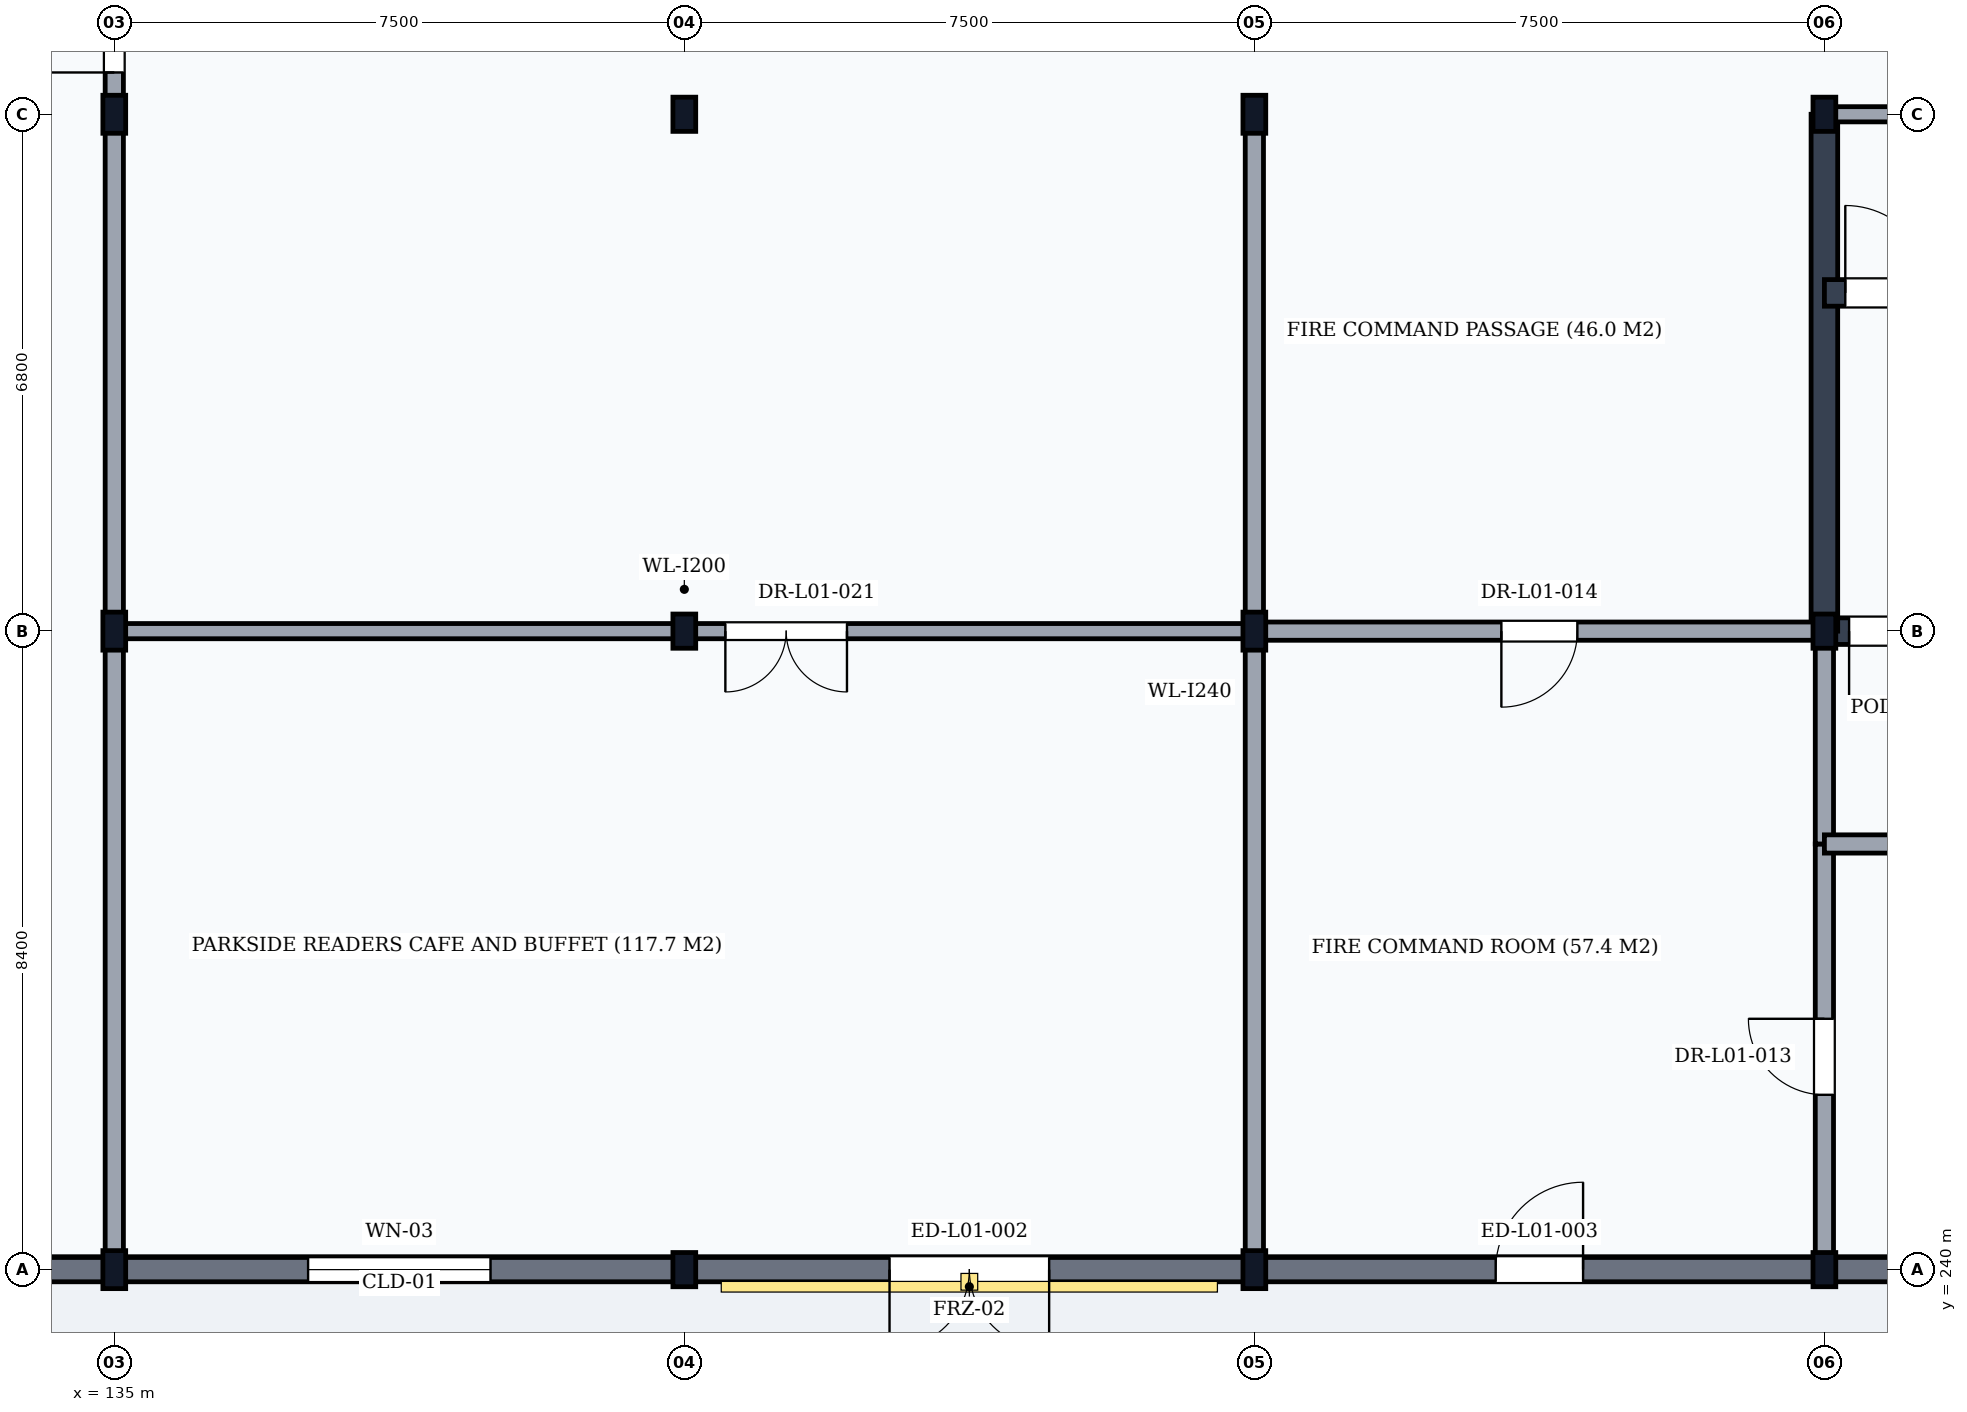
"""IFC4 building model, lengths in metres.
Left out: names, types, materials, properties, quantities, classifications, styles, units other than length and angle.
Written with IfcOpenShell. Run it as: python <this file> out.ifc"""

import sys

from ifc_helpers import new_model, si_unit, direction, frame, frame_2d, origin, origin_2d, place, context, subcontext, project, spatial, rectangle, i_section, extrude, element, fill, save


model = new_model("IFC4")
c1 = context("Model", 3, precision=1e-05, world=origin(), true_north=direction((0.0, 1.0)))
c2 = subcontext(c1, "Body", "Model", "MODEL_VIEW")
j1 = project(units=[si_unit("LENGTHUNIT", "METRE"), si_unit("PLANEANGLEUNIT", "RADIAN")], contexts=[c1])
p1 = place(None, origin())
s1 = spatial("IfcSite", under=j1, at=p1, CompositionType="ELEMENT")
p2 = place(p1, origin())
s2 = spatial("IfcBuilding", under=s1, at=p2, CompositionType="ELEMENT")
p3 = place(p2, origin())
s3 = spatial("IfcBuildingStorey", under=s2, at=p3, CompositionType="ELEMENT", Elevation=0.0)
for number, where, z_axis, x_axis in (
    (1, (135.0, 240.0, 0.0), (0.0, 0.0, 1.0), (1.0, 0.0, 0.0)),
    (2, (135.0, 248.4, 0.0), (0.0, 0.0, 1.0), (1.0, 0.0, 0.0)),
    (3, (135.0, 255.2, 0.0), (0.0, 0.0, 1.0), (1.0, 0.0, 0.0)),
):
    element("IfcColumn", number, at=place(p3, frame(where, z_axis=z_axis, x_axis=x_axis)), inside=s3, PredefinedType="COLUMN", context=c2, shape_type="SweptSolid", body=[
        extrude(i_section(OverallWidth=0.3, OverallDepth=0.5, WebThickness=0.014, FlangeThickness=0.028, FilletRadius=0.027, at=origin_2d()), origin(), (0.0, 0.0, 1.0), 5.4),
    ])
for number, where, z_axis, x_axis in (
    (4, (142.5, 240.0, 0.0), (0.0, 0.0, 1.0), (1.0, 0.0, 0.0)),
    (5, (142.5, 248.4, 0.0), (0.0, 0.0, 1.0), (1.0, 0.0, 0.0)),
    (6, (142.5, 255.2, 0.0), (0.0, 0.0, 1.0), (1.0, 0.0, 0.0)),
):
    element("IfcColumn", number, at=place(p3, frame(where, z_axis=z_axis, x_axis=x_axis)), inside=s3, PredefinedType="COLUMN", context=c2, shape_type="SweptSolid", body=[
        extrude(i_section(OverallWidth=0.3, OverallDepth=0.45, WebThickness=0.014, FlangeThickness=0.026, FilletRadius=0.027, at=origin_2d()), origin(), (0.0, 0.0, 1.0), 5.4),
    ])
for number, where, z_axis, x_axis in (
    (7, (150.0, 240.0, 0.0), (0.0, 0.0, 1.0), (1.0, 0.0, 0.0)),
    (8, (150.0, 248.4, 0.0), (0.0, 0.0, 1.0), (1.0, 0.0, 0.0)),
    (9, (150.0, 255.2, 0.0), (0.0, 0.0, 1.0), (1.0, 0.0, 0.0)),
):
    element("IfcColumn", number, at=place(p3, frame(where, z_axis=z_axis, x_axis=x_axis)), inside=s3, PredefinedType="COLUMN", context=c2, shape_type="SweptSolid", body=[
        extrude(i_section(OverallWidth=0.3, OverallDepth=0.5, WebThickness=0.014, FlangeThickness=0.028, FilletRadius=0.027, at=origin_2d()), origin(), (0.0, 0.0, 1.0), 5.4),
    ])
for number, where, z_axis, x_axis in (
    (10, (157.5, 240.0, 0.0), (0.0, 0.0, 1.0), (1.0, 0.0, 0.0)),
    (11, (157.5, 248.4, 0.0), (0.0, 0.0, 1.0), (1.0, 0.0, 0.0)),
    (12, (157.5, 255.2, 0.0), (0.0, 0.0, 1.0), (1.0, 0.0, 0.0)),
):
    element("IfcColumn", number, at=place(p3, frame(where, z_axis=z_axis, x_axis=x_axis)), inside=s3, PredefinedType="COLUMN", context=c2, shape_type="SweptSolid", body=[
        extrude(i_section(OverallWidth=0.3, OverallDepth=0.45, WebThickness=0.014, FlangeThickness=0.026, FilletRadius=0.027, at=origin_2d()), origin(), (0.0, 0.0, 1.0), 5.4),
    ])
p4 = place(p3, frame((127.506, 240.0, 0.0), z_axis=(0.0, 0.0, 1.0), x_axis=(1.0, 0.0, 0.0)))
e13 = element("IfcWall", 13, at=p4, inside=s3, PredefinedType="SOLIDWALL", context=c2, shape_type="SweptSolid", body=[
    extrude(rectangle(XDim=7.488, YDim=0.32, at=frame_2d((3.744, 0.0))), origin(), (0.0, 0.0, 1.0), 4.878),
])
p5 = place(p4, frame((2.144, 0.0, 0.0)))
e14 = element("IfcOpeningElement", 14, at=p5, cuts=e13, PredefinedType="OPENING", context=c2, shape_type="SweptSolid", body=[
    extrude(rectangle(XDim=3.2, YDim=3.0, at=frame_2d((1.6, 1.5))), frame((0.0, 0.175, 0.0), z_axis=(0.0, -1.0, 0.0), x_axis=(1.0, 0.0, 0.0)), (0.0, 0.0, 1.0), 0.35),
])
p6 = place(p3, frame((135.006, 240.0, 0.0), z_axis=(0.0, 0.0, 1.0), x_axis=(1.0, 0.0, 0.0)))
e15 = element("IfcWall", 15, at=p6, inside=s3, PredefinedType="SOLIDWALL", context=c2, shape_type="SweptSolid", body=[
    extrude(rectangle(XDim=7.488, YDim=0.32, at=frame_2d((3.744, 0.0))), origin(), (0.0, 0.0, 1.0), 4.878),
])
p7 = place(p6, frame((2.544, 0.0, 0.95)))
e16 = element("IfcOpeningElement", 16, at=p7, cuts=e15, PredefinedType="OPENING", context=c2, shape_type="SweptSolid", body=[
    extrude(rectangle(XDim=2.4, YDim=2.8, at=frame_2d((1.2, 1.4))), frame((0.0, 0.175, 0.0), z_axis=(0.0, -1.0, 0.0), x_axis=(1.0, 0.0, 0.0)), (0.0, 0.0, 1.0), 0.35),
])
p8 = place(p3, frame((142.506, 240.0, 0.0), z_axis=(0.0, 0.0, 1.0), x_axis=(1.0, 0.0, 0.0)))
e17 = element("IfcWall", 17, at=p8, inside=s3, PredefinedType="SOLIDWALL", context=c2, shape_type="SweptSolid", body=[
    extrude(rectangle(XDim=7.488, YDim=0.32, at=frame_2d((3.744, 0.0))), origin(), (0.0, 0.0, 1.0), 4.878),
])
p9 = place(p8, frame((2.694, 0.0, 0.0)))
e18 = element("IfcOpeningElement", 18, at=p9, cuts=e17, PredefinedType="OPENING", context=c2, shape_type="SweptSolid", body=[
    extrude(rectangle(XDim=2.1, YDim=2.7, at=frame_2d((1.05, 1.35))), frame((0.0, 0.175, 0.0), z_axis=(0.0, -1.0, 0.0), x_axis=(1.0, 0.0, 0.0)), (0.0, 0.0, 1.0), 0.35),
])
p10 = place(p3, frame((150.006, 240.0, 0.0), z_axis=(0.0, 0.0, 1.0), x_axis=(1.0, 0.0, 0.0)))
e19 = element("IfcWall", 19, at=p10, inside=s3, PredefinedType="SOLIDWALL", context=c2, shape_type="SweptSolid", body=[
    extrude(rectangle(XDim=7.488, YDim=0.32, at=frame_2d((3.744, 0.0))), origin(), (0.0, 0.0, 1.0), 4.878),
])
p11 = place(p10, frame((3.169, 0.0, 0.0)))
e20 = element("IfcOpeningElement", 20, at=p11, cuts=e19, PredefinedType="OPENING", context=c2, shape_type="SweptSolid", body=[
    extrude(rectangle(XDim=1.15, YDim=2.25, at=frame_2d((0.575, 1.125))), frame((0.0, 0.175, 0.0), z_axis=(0.0, -1.0, 0.0), x_axis=(1.0, 0.0, 0.0)), (0.0, 0.0, 1.0), 0.35),
])
p12 = place(p3, frame((157.506, 240.0, 0.0), z_axis=(0.0, 0.0, 1.0), x_axis=(1.0, 0.0, 0.0)))
e21 = element("IfcWall", 21, at=p12, inside=s3, PredefinedType="SOLIDWALL", context=c2, shape_type="SweptSolid", body=[
    extrude(rectangle(XDim=7.488, YDim=0.32, at=frame_2d((3.744, 0.0))), origin(), (0.0, 0.0, 1.0), 4.878),
])
p13 = place(p12, frame((2.844, 0.0, 0.95)))
e22 = element("IfcOpeningElement", 22, at=p13, cuts=e21, PredefinedType="OPENING", context=c2, shape_type="SweptSolid", body=[
    extrude(rectangle(XDim=1.8, YDim=2.6, at=frame_2d((0.9, 1.3))), frame((0.0, 0.175, 0.0), z_axis=(0.0, -1.0, 0.0), x_axis=(1.0, 0.0, 0.0)), (0.0, 0.0, 1.0), 0.35),
])
p14 = place(p3, frame((120.1, 240.1, 5.4), z_axis=(0.0, 0.0, 1.0), x_axis=(1.0, 0.0, 0.0)))
e23 = element("IfcWall", 23, at=p14, inside=s3, PredefinedType="PARAPET", context=c2, shape_type="SweptSolid", body=[
    extrude(rectangle(XDim=167.8, YDim=0.18, at=frame_2d((83.9, 0.0))), origin(), (0.0, 0.0, 1.0), 1.2),
])
p15 = place(p3, frame((157.5, 248.4, 0.0), z_axis=(0.0, 0.0, 1.0), x_axis=(1.0, 0.0, 0.0)))
e24 = element("IfcWall", 24, at=p15, inside=s3, PredefinedType="SHEAR", context=c2, shape_type="SweptSolid", body=[
    extrude(rectangle(XDim=7.5, YDim=0.35, at=frame_2d((3.75, 0.0))), origin(), (0.0, 0.0, 1.0), 5.14),
])
p16 = place(p15, frame((0.325, 0.0, 0.0)))
e25 = element("IfcOpeningElement", 25, at=p16, cuts=e24, PredefinedType="OPENING", context=c2, shape_type="SweptSolid", body=[
    extrude(rectangle(XDim=1.15, YDim=2.15, at=frame_2d((0.575, 1.075))), frame((0.0, 0.19, 0.0), z_axis=(0.0, -1.0, 0.0), x_axis=(1.0, 0.0, 0.0)), (0.0, 0.0, 1.0), 0.38),
])
p17 = place(p3, frame((157.5, 248.4, 0.0), z_axis=(0.0, 0.0, 1.0), x_axis=(0.0, 1.0, 0.0)))
e26 = element("IfcWall", 26, at=p17, inside=s3, PredefinedType="SHEAR", context=c2, shape_type="SweptSolid", body=[
    extrude(rectangle(XDim=6.8, YDim=0.35, at=frame_2d((3.4, 0.0))), origin(), (0.0, 0.0, 1.0), 5.14),
])
p18 = place(p3, frame((157.5, 252.85, 0.0), z_axis=(0.0, 0.0, 1.0), x_axis=(1.0, 0.0, 0.0)))
e27 = element("IfcWall", 27, at=p18, inside=s3, PredefinedType="SHEAR", context=c2, shape_type="SweptSolid", body=[
    extrude(rectangle(XDim=7.5, YDim=0.35, at=frame_2d((3.75, 0.0))), origin(), (0.0, 0.0, 1.0), 5.14),
])
p19 = place(p18, frame((0.275, 0.0, 0.0)))
e28 = element("IfcOpeningElement", 28, at=p19, cuts=e27, PredefinedType="OPENING", context=c2, shape_type="SweptSolid", body=[
    extrude(rectangle(XDim=1.15, YDim=2.15, at=frame_2d((0.575, 1.075))), frame((0.0, 0.19, 0.0), z_axis=(0.0, -1.0, 0.0), x_axis=(1.0, 0.0, 0.0)), (0.0, 0.0, 1.0), 0.38),
])
p20 = place(p3, frame((157.5, 255.2, 0.0), z_axis=(0.0, 0.0, 1.0), x_axis=(1.0, 0.0, 0.0)))
e29 = element("IfcWall", 29, at=p20, inside=s3, PredefinedType="PARTITIONING", context=c2, shape_type="SweptSolid", body=[
    extrude(rectangle(XDim=7.5, YDim=0.2, at=frame_2d((3.75, 0.0))), origin(), (0.0, 0.0, 1.0), 4.778),
])
p21 = place(p20, frame((3.025, 0.0, 0.0)))
e30 = element("IfcOpeningElement", 30, at=p21, cuts=e29, PredefinedType="OPENING", context=c2, shape_type="SweptSolid", body=[
    extrude(rectangle(XDim=1.45, YDim=2.2, at=frame_2d((0.725, 1.1))), frame((0.0, 0.115, 0.0), z_axis=(0.0, -1.0, 0.0), x_axis=(1.0, 0.0, 0.0)), (0.0, 0.0, 1.0), 0.23),
])
p22 = place(p3, frame((150.0, 240.0, 0.0), z_axis=(0.0, 0.0, 1.0), x_axis=(0.0, 1.0, 0.0)))
e31 = element("IfcWall", 31, at=p22, inside=s3, PredefinedType="PARTITIONING", context=c2, shape_type="SweptSolid", body=[
    extrude(rectangle(XDim=15.2, YDim=0.24, at=frame_2d((7.6, 0.0))), origin(), (0.0, 0.0, 1.0), 4.688),
])
p23 = place(p3, frame((157.5, 240.0, 0.0), z_axis=(0.0, 0.0, 1.0), x_axis=(0.0, 1.0, 0.0)))
e32 = element("IfcWall", 32, at=p23, inside=s3, PredefinedType="PARTITIONING", context=c2, shape_type="SweptSolid", body=[
    extrude(rectangle(XDim=5.6, YDim=0.24, at=frame_2d((2.8, 0.0))), origin(), (0.0, 0.0, 1.0), 4.688),
])
p24 = place(p23, frame((2.3, 0.0, 0.0)))
e33 = element("IfcOpeningElement", 33, at=p24, cuts=e32, PredefinedType="OPENING", context=c2, shape_type="SweptSolid", body=[
    extrude(rectangle(XDim=1.0, YDim=2.1, at=frame_2d((0.5, 1.05))), frame((0.0, 0.135, 0.0), z_axis=(0.0, -1.0, 0.0), x_axis=(1.0, 0.0, 0.0)), (0.0, 0.0, 1.0), 0.27),
])
p25 = place(p3, frame((157.5, 245.6, 0.0), z_axis=(0.0, 0.0, 1.0), x_axis=(0.0, 1.0, 0.0)))
e34 = element("IfcWall", 34, at=p25, inside=s3, PredefinedType="PARTITIONING", context=c2, shape_type="SweptSolid", body=[
    extrude(rectangle(XDim=2.8, YDim=0.24, at=frame_2d((1.4, 0.0))), origin(), (0.0, 0.0, 1.0), 4.688),
])
p26 = place(p3, frame((150.0, 248.4, 0.0), z_axis=(0.0, 0.0, 1.0), x_axis=(1.0, 0.0, 0.0)))
e35 = element("IfcWall", 35, at=p26, inside=s3, PredefinedType="PARTITIONING", context=c2, shape_type="SweptSolid", body=[
    extrude(rectangle(XDim=7.5, YDim=0.24, at=frame_2d((3.75, 0.0))), origin(), (0.0, 0.0, 1.0), 4.778),
])
p27 = place(p26, frame((3.25, 0.0, 0.0)))
e36 = element("IfcOpeningElement", 36, at=p27, cuts=e35, PredefinedType="OPENING", context=c2, shape_type="SweptSolid", body=[
    extrude(rectangle(XDim=1.0, YDim=2.1, at=frame_2d((0.5, 1.05))), frame((0.0, 0.135, 0.0), z_axis=(0.0, -1.0, 0.0), x_axis=(1.0, 0.0, 0.0)), (0.0, 0.0, 1.0), 0.27),
])
p28 = place(p3, frame((135.0, 240.0, 0.0), z_axis=(0.0, 0.0, 1.0), x_axis=(0.0, 1.0, 0.0)))
e37 = element("IfcWall", 37, at=p28, inside=s3, PredefinedType="PARTITIONING", context=c2, shape_type="SweptSolid", body=[
    extrude(rectangle(XDim=18.2, YDim=0.24, at=frame_2d((9.1, 0.0))), origin(), (0.0, 0.0, 1.0), 4.688),
])
p29 = place(p28, frame((15.75, 0.0, 0.0)))
e38 = element("IfcOpeningElement", 38, at=p29, cuts=e37, PredefinedType="OPENING", context=c2, shape_type="SweptSolid", body=[
    extrude(rectangle(XDim=1.8, YDim=2.25, at=frame_2d((0.9, 1.125))), frame((0.0, 0.135, 0.0), z_axis=(0.0, -1.0, 0.0), x_axis=(1.0, 0.0, 0.0)), (0.0, 0.0, 1.0), 0.27),
])
p30 = place(p3, frame((157.5, 245.6, 0.0), z_axis=(0.0, 0.0, 1.0), x_axis=(1.0, 0.0, 0.0)))
e39 = element("IfcWall", 39, at=p30, inside=s3, PredefinedType="PARTITIONING", context=c2, shape_type="SweptSolid", body=[
    extrude(rectangle(XDim=7.5, YDim=0.24, at=frame_2d((3.75, 0.0))), origin(), (0.0, 0.0, 1.0), 5.15),
])
p31 = place(p3, frame((135.0, 248.4, 0.0), z_axis=(0.0, 0.0, 1.0), x_axis=(1.0, 0.0, 0.0)))
e40 = element("IfcWall", 40, at=p31, inside=s3, PredefinedType="PARTITIONING", context=c2, shape_type="SweptSolid", body=[
    extrude(rectangle(XDim=15.0, YDim=0.2, at=frame_2d((7.5, 0.0))), origin(), (0.0, 0.0, 1.0), 4.778),
])
p32 = place(p31, frame((8.04, 0.0, 0.0)))
e41 = element("IfcOpeningElement", 41, at=p32, cuts=e40, PredefinedType="OPENING", context=c2, shape_type="SweptSolid", body=[
    extrude(rectangle(XDim=1.6, YDim=2.25, at=frame_2d((0.8, 1.125))), frame((0.0, 0.115, 0.0), z_axis=(0.0, -1.0, 0.0), x_axis=(1.0, 0.0, 0.0)), (0.0, 0.0, 1.0), 0.23),
])
p33 = place(p7, origin())
e42 = element("IfcWindow", 42, at=p33, inside=s3, PartitioningType="DOUBLE_PANEL_VERTICAL", PredefinedType="WINDOW", context=c2, shape_type="SweptSolid", body=[
    extrude(rectangle(XDim=2.4, YDim=2.8, at=frame_2d((1.2, 1.4))), frame((0.0, 0.03, 0.0), z_axis=(0.0, -1.0, 0.0), x_axis=(1.0, 0.0, 0.0)), (0.0, 0.0, 1.0), 0.06),
])
fill(e16, e42)
p34 = place(p9, frame((2.1, 0.0, 0.0), z_axis=(0.0, 0.0, 1.0), x_axis=(-1.0, 0.0, 0.0)))
e43 = element("IfcDoor", 43, at=p34, inside=s3, OperationType="DOUBLE_DOOR_SINGLE_SWING", PredefinedType="DOOR", context=c2, shape_type="SweptSolid", body=[
    extrude(rectangle(XDim=2.1, YDim=2.7, at=frame_2d((1.05, 1.35))), frame((0.0, 0.025, 0.0), z_axis=(0.0, -1.0, 0.0), x_axis=(1.0, 0.0, 0.0)), (0.0, 0.0, 1.0), 0.05),
])
fill(e18, e43)
p35 = place(p11, frame((1.15, 0.0, 0.0), z_axis=(0.0, 0.0, 1.0), x_axis=(-1.0, 0.0, 0.0)))
e44 = element("IfcDoor", 44, at=p35, inside=s3, OperationType="SINGLE_SWING_LEFT", PredefinedType="DOOR", context=c2, shape_type="SweptSolid", body=[
    extrude(rectangle(XDim=1.15, YDim=2.25, at=frame_2d((0.575, 1.125))), frame((0.0, 0.025, 0.0), z_axis=(0.0, -1.0, 0.0), x_axis=(1.0, 0.0, 0.0)), (0.0, 0.0, 1.0), 0.05),
])
fill(e20, e44)
p36 = place(p19, origin())
e45 = element("IfcDoor", 45, at=p36, inside=s3, OperationType="SINGLE_SWING_LEFT", PredefinedType="DOOR", context=c2, shape_type="SweptSolid", body=[
    extrude(rectangle(XDim=1.15, YDim=2.15, at=frame_2d((0.575, 1.075))), frame((0.0, 0.025, 0.0), z_axis=(0.0, -1.0, 0.0), x_axis=(1.0, 0.0, 0.0)), (0.0, 0.0, 1.0), 0.05),
])
fill(e28, e45)
p37 = place(p16, frame((1.15, 0.0, 0.0), z_axis=(0.0, 0.0, 1.0), x_axis=(-1.0, 0.0, 0.0)))
e46 = element("IfcDoor", 46, at=p37, inside=s3, OperationType="SINGLE_SWING_RIGHT", PredefinedType="DOOR", context=c2, shape_type="SweptSolid", body=[
    extrude(rectangle(XDim=1.15, YDim=2.15, at=frame_2d((0.575, 1.075))), frame((0.0, 0.025, 0.0), z_axis=(0.0, -1.0, 0.0), x_axis=(1.0, 0.0, 0.0)), (0.0, 0.0, 1.0), 0.05),
])
fill(e25, e46)
p38 = place(p24, frame((1.0, 0.0, 0.0), z_axis=(0.0, 0.0, 1.0), x_axis=(-1.0, 0.0, 0.0)))
e47 = element("IfcDoor", 47, at=p38, inside=s3, OperationType="SINGLE_SWING_LEFT", PredefinedType="DOOR", context=c2, shape_type="SweptSolid", body=[
    extrude(rectangle(XDim=1.0, YDim=2.1, at=frame_2d((0.5, 1.05))), frame((0.0, 0.025, 0.0), z_axis=(0.0, -1.0, 0.0), x_axis=(1.0, 0.0, 0.0)), (0.0, 0.0, 1.0), 0.05),
])
fill(e33, e47)
p39 = place(p27, frame((1.0, 0.0, 0.0), z_axis=(0.0, 0.0, 1.0), x_axis=(-1.0, 0.0, 0.0)))
e48 = element("IfcDoor", 48, at=p39, inside=s3, OperationType="SINGLE_SWING_RIGHT", PredefinedType="DOOR", context=c2, shape_type="SweptSolid", body=[
    extrude(rectangle(XDim=1.0, YDim=2.1, at=frame_2d((0.5, 1.05))), frame((0.0, 0.025, 0.0), z_axis=(0.0, -1.0, 0.0), x_axis=(1.0, 0.0, 0.0)), (0.0, 0.0, 1.0), 0.05),
])
fill(e36, e48)
p40 = place(p29, origin())
e49 = element("IfcDoor", 49, at=p40, inside=s3, OperationType="DOUBLE_DOOR_SINGLE_SWING", PredefinedType="DOOR", context=c2, shape_type="SweptSolid", body=[
    extrude(rectangle(XDim=1.8, YDim=2.25, at=frame_2d((0.9, 1.125))), frame((0.0, 0.025, 0.0), z_axis=(0.0, -1.0, 0.0), x_axis=(1.0, 0.0, 0.0)), (0.0, 0.0, 1.0), 0.05),
])
fill(e38, e49)
p41 = place(p32, frame((1.6, 0.0, 0.0), z_axis=(0.0, 0.0, 1.0), x_axis=(-1.0, 0.0, 0.0)))
e50 = element("IfcDoor", 50, at=p41, inside=s3, OperationType="DOUBLE_DOOR_SINGLE_SWING", PredefinedType="DOOR", context=c2, shape_type="SweptSolid", body=[
    extrude(rectangle(XDim=1.6, YDim=2.25, at=frame_2d((0.8, 1.125))), frame((0.0, 0.025, 0.0), z_axis=(0.0, -1.0, 0.0), x_axis=(1.0, 0.0, 0.0)), (0.0, 0.0, 1.0), 0.05),
])
fill(e41, e50)
save(model, sys.argv[1])
